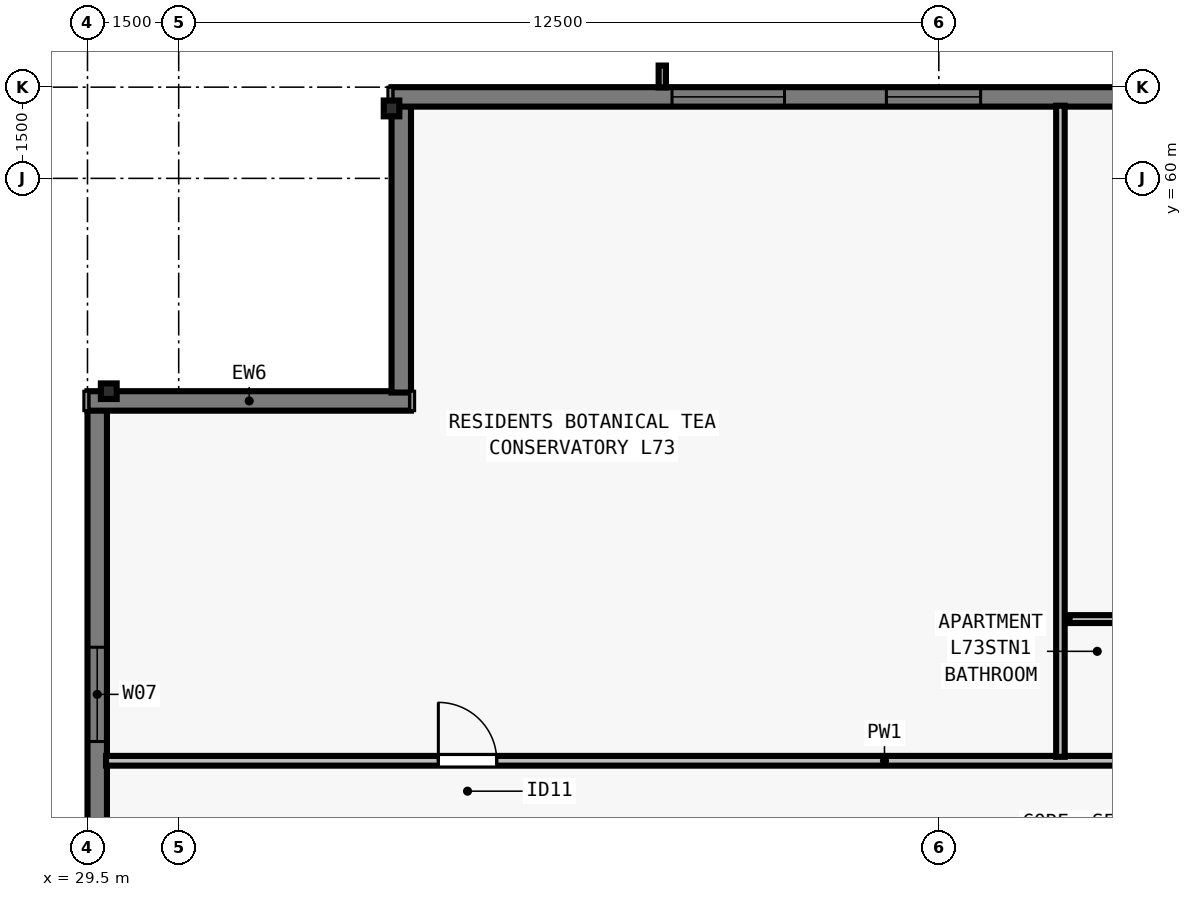
"""IFC4 building model, lengths in metres.
Left out: names, types, materials, properties, quantities, classifications, styles, units other than length and angle.
Written with IfcOpenShell. Run it as: python <this file> out.ifc"""

import sys

from ifc_helpers import new_model, si_unit, direction, frame, frame_2d, origin, origin_2d, place, context, subcontext, project, spatial, rectangle, i_section, extrude, element, fill, save


model = new_model("IFC4")
c1 = context("Model", 3, precision=1e-05, world=origin(), true_north=direction((0.0, 1.0)))
c2 = subcontext(c1, "Body", "Model", "MODEL_VIEW")
j1 = project(units=[si_unit("LENGTHUNIT", "METRE"), si_unit("PLANEANGLEUNIT", "RADIAN")], contexts=[c1])
p1 = place(None, origin())
s1 = spatial("IfcSite", under=j1, at=p1, CompositionType="ELEMENT")
p2 = place(p1, origin())
s2 = spatial("IfcBuilding", under=s1, at=p2, CompositionType="ELEMENT")
p3 = place(p2, frame((0.0, 0.0, 265.5)))
s3 = spatial("IfcBuildingStorey", under=s2, at=p3, CompositionType="ELEMENT", Elevation=265.5)
for number, where, z_axis, x_axis in (
    (1, (34.5, 61.15, 0.0), (0.0, 0.0, 1.0), (1.0, 0.0, 0.0)),
    (2, (29.85, 56.5, 0.0), (0.0, 0.0, 1.0), (0.0, 1.0, 0.0)),
):
    element("IfcColumn", number, at=place(p3, frame(where, z_axis=z_axis, x_axis=x_axis)), inside=s3, PredefinedType="COLUMN", context=c2, shape_type="SweptSolid", body=[
        extrude(i_section(OverallWidth=0.256, OverallDepth=0.26, WebThickness=0.01, FlangeThickness=0.017, FilletRadius=0.013, at=origin_2d()), origin(), (0.0, 0.0, 1.0), 3.5),
    ])
p4 = place(p3, frame((29.66, 21.5, 0.0), z_axis=(0.0, 0.0, 1.0), x_axis=(0.0, 1.0, 0.0)))
e3 = element("IfcWall", 3, at=p4, inside=s3, PredefinedType="SOLIDWALL", context=c2, shape_type="SweptSolid", body=[
    extrude(rectangle(XDim=34.702, YDim=0.32, at=frame_2d((17.351, 0.0))), origin(), (0.0, 0.0, 1.0), 3.29),
])
p5 = place(p4, frame((6.888, 0.0, 0.8)))
e4 = element("IfcOpeningElement", 4, at=p5, cuts=e3, PredefinedType="OPENING", context=c2, shape_type="SweptSolid", body=[
    extrude(rectangle(XDim=1.55, YDim=1.678, at=frame_2d((0.775, 0.839))), frame((0.0, 0.17, 0.0), z_axis=(0.0, -1.0, 0.0), x_axis=(1.0, 0.0, 0.0)), (0.0, 0.0, 1.0), 0.34),
])
p6 = place(p4, frame((10.113, 0.0, 0.8)))
e5 = element("IfcOpeningElement", 5, at=p6, cuts=e3, PredefinedType="OPENING", context=c2, shape_type="SweptSolid", body=[
    extrude(rectangle(XDim=1.85, YDim=1.678, at=frame_2d((0.925, 0.839))), frame((0.0, 0.17, 0.0), z_axis=(0.0, -1.0, 0.0), x_axis=(1.0, 0.0, 0.0)), (0.0, 0.0, 1.0), 0.34),
])
p7 = place(p4, frame((14.888, 0.0, 0.8)))
e6 = element("IfcOpeningElement", 6, at=p7, cuts=e3, PredefinedType="OPENING", context=c2, shape_type="SweptSolid", body=[
    extrude(rectangle(XDim=1.55, YDim=1.678, at=frame_2d((0.775, 0.839))), frame((0.0, 0.17, 0.0), z_axis=(0.0, -1.0, 0.0), x_axis=(1.0, 0.0, 0.0)), (0.0, 0.0, 1.0), 0.34),
])
p8 = place(p4, frame((18.114, 0.0, 0.8)))
e7 = element("IfcOpeningElement", 7, at=p8, cuts=e3, PredefinedType="OPENING", context=c2, shape_type="SweptSolid", body=[
    extrude(rectangle(XDim=1.85, YDim=1.678, at=frame_2d((0.925, 0.839))), frame((0.0, 0.17, 0.0), z_axis=(0.0, -1.0, 0.0), x_axis=(1.0, 0.0, 0.0)), (0.0, 0.0, 1.0), 0.34),
])
p9 = place(p4, frame((23.614, 0.0, 0.8)))
e8 = element("IfcOpeningElement", 8, at=p9, cuts=e3, PredefinedType="OPENING", context=c2, shape_type="SweptSolid", body=[
    extrude(rectangle(XDim=1.85, YDim=1.678, at=frame_2d((0.925, 0.839))), frame((0.0, 0.17, 0.0), z_axis=(0.0, -1.0, 0.0), x_axis=(1.0, 0.0, 0.0)), (0.0, 0.0, 1.0), 0.34),
])
p10 = place(p4, frame((29.24, 0.0, 0.8)))
e9 = element("IfcOpeningElement", 9, at=p10, cuts=e3, PredefinedType="OPENING", context=c2, shape_type="SweptSolid", body=[
    extrude(rectangle(XDim=1.55, YDim=1.678, at=frame_2d((0.775, 0.839))), frame((0.0, 0.17, 0.0), z_axis=(0.0, -1.0, 0.0), x_axis=(1.0, 0.0, 0.0)), (0.0, 0.0, 1.0), 0.34),
])
p11 = place(p3, frame((29.5, 56.34, 0.0), z_axis=(0.0, 0.0, 1.0), x_axis=(1.0, 0.0, 0.0)))
e10 = element("IfcWall", 10, at=p11, inside=s3, PredefinedType="SOLIDWALL", context=c2, shape_type="SweptSolid", body=[
    extrude(rectangle(XDim=5.32, YDim=0.32, at=frame_2d((2.66, 0.0))), origin(), (0.0, 0.0, 1.0), 3.29),
])
p12 = place(p3, frame((34.66, 56.478, 0.0), z_axis=(0.0, 0.0, 1.0), x_axis=(0.0, 1.0, 0.0)))
e11 = element("IfcWall", 11, at=p12, inside=s3, PredefinedType="SOLIDWALL", context=c2, shape_type="SweptSolid", body=[
    extrude(rectangle(XDim=4.724, YDim=0.32, at=frame_2d((2.362, 0.0))), origin(), (0.0, 0.0, 1.0), 3.29),
])
p13 = place(p3, frame((34.5, 61.34, 0.0), z_axis=(0.0, 0.0, 1.0), x_axis=(1.0, 0.0, 0.0)))
e12 = element("IfcWall", 12, at=p13, inside=s3, PredefinedType="SOLIDWALL", context=c2, shape_type="SweptSolid", body=[
    extrude(rectangle(XDim=34.702, YDim=0.32, at=frame_2d((17.351, 0.0))), origin(), (0.0, 0.0, 1.0), 3.29),
])
p14 = place(p13, frame((4.613, 0.0, 0.8)))
e13 = element("IfcOpeningElement", 13, at=p14, cuts=e12, PredefinedType="OPENING", context=c2, shape_type="SweptSolid", body=[
    extrude(rectangle(XDim=1.85, YDim=1.678, at=frame_2d((0.925, 0.839))), frame((0.0, 0.17, 0.0), z_axis=(0.0, -1.0, 0.0), x_axis=(1.0, 0.0, 0.0)), (0.0, 0.0, 1.0), 0.34),
])
p15 = place(p13, frame((8.138, 0.0, 0.8)))
e14 = element("IfcOpeningElement", 14, at=p15, cuts=e12, PredefinedType="OPENING", context=c2, shape_type="SweptSolid", body=[
    extrude(rectangle(XDim=1.55, YDim=1.678, at=frame_2d((0.775, 0.839))), frame((0.0, 0.17, 0.0), z_axis=(0.0, -1.0, 0.0), x_axis=(1.0, 0.0, 0.0)), (0.0, 0.0, 1.0), 0.34),
])
p16 = place(p13, frame((14.888, 0.0, 0.8)))
e15 = element("IfcOpeningElement", 15, at=p16, cuts=e12, PredefinedType="OPENING", context=c2, shape_type="SweptSolid", body=[
    extrude(rectangle(XDim=1.55, YDim=1.678, at=frame_2d((0.775, 0.839))), frame((0.0, 0.17, 0.0), z_axis=(0.0, -1.0, 0.0), x_axis=(1.0, 0.0, 0.0)), (0.0, 0.0, 1.0), 0.34),
])
p17 = place(p13, frame((19.364, 0.0, 0.8)))
e16 = element("IfcOpeningElement", 16, at=p17, cuts=e12, PredefinedType="OPENING", context=c2, shape_type="SweptSolid", body=[
    extrude(rectangle(XDim=1.85, YDim=1.678, at=frame_2d((0.925, 0.839))), frame((0.0, 0.17, 0.0), z_axis=(0.0, -1.0, 0.0), x_axis=(1.0, 0.0, 0.0)), (0.0, 0.0, 1.0), 0.34),
])
p18 = place(p13, frame((25.314, 0.0, 0.8)))
e17 = element("IfcOpeningElement", 17, at=p18, cuts=e12, PredefinedType="OPENING", context=c2, shape_type="SweptSolid", body=[
    extrude(rectangle(XDim=1.85, YDim=1.678, at=frame_2d((0.925, 0.839))), frame((0.0, 0.17, 0.0), z_axis=(0.0, -1.0, 0.0), x_axis=(1.0, 0.0, 0.0)), (0.0, 0.0, 1.0), 0.34),
])
p19 = place(p13, frame((28.389, 0.0, 0.8)))
e18 = element("IfcOpeningElement", 18, at=p19, cuts=e12, PredefinedType="OPENING", context=c2, shape_type="SweptSolid", body=[
    extrude(rectangle(XDim=1.55, YDim=1.678, at=frame_2d((0.775, 0.839))), frame((0.0, 0.17, 0.0), z_axis=(0.0, -1.0, 0.0), x_axis=(1.0, 0.0, 0.0)), (0.0, 0.0, 1.0), 0.34),
])
p20 = place(p3, frame((29.805, 50.423, 0.0), z_axis=(0.0, 0.0, 1.0), x_axis=(1.0, 0.0, 0.0)))
e19 = element("IfcWall", 19, at=p20, inside=s3, PredefinedType="PARTITIONING", context=c2, shape_type="SweptSolid", body=[
    extrude(rectangle(XDim=44.39, YDim=0.16, at=frame_2d((22.195, 0.0))), origin(), (0.0, 0.0, 1.0), 2.958),
])
p21 = place(p20, frame((5.465, 0.0, 0.0)))
e20 = element("IfcOpeningElement", 20, at=p21, cuts=e19, PredefinedType="OPENING", context=c2, shape_type="SweptSolid", body=[
    extrude(rectangle(XDim=0.96, YDim=2.12, at=frame_2d((0.48, 1.06))), frame((0.0, 0.09, 0.0), z_axis=(0.0, -1.0, 0.0), x_axis=(1.0, 0.0, 0.0)), (0.0, 0.0, 1.0), 0.18),
])
p22 = place(p20, frame((19.179, 0.0, 0.0)))
e21 = element("IfcOpeningElement", 21, at=p22, cuts=e19, PredefinedType="OPENING", context=c2, shape_type="SweptSolid", body=[
    extrude(rectangle(XDim=0.96, YDim=2.18, at=frame_2d((0.48, 1.09))), frame((0.0, 0.09, 0.0), z_axis=(0.0, -1.0, 0.0), x_axis=(1.0, 0.0, 0.0)), (0.0, 0.0, 1.0), 0.18),
])
p23 = place(p20, frame((26.106, 0.0, 0.0)))
e22 = element("IfcOpeningElement", 22, at=p23, cuts=e19, PredefinedType="OPENING", context=c2, shape_type="SweptSolid", body=[
    extrude(rectangle(XDim=0.96, YDim=2.18, at=frame_2d((0.48, 1.09))), frame((0.0, 0.09, 0.0), z_axis=(0.0, -1.0, 0.0), x_axis=(1.0, 0.0, 0.0)), (0.0, 0.0, 1.0), 0.18),
])
p24 = place(p20, frame((33.214, 0.0, 0.0)))
e23 = element("IfcOpeningElement", 23, at=p24, cuts=e19, PredefinedType="OPENING", context=c2, shape_type="SweptSolid", body=[
    extrude(rectangle(XDim=0.96, YDim=2.18, at=frame_2d((0.48, 1.09))), frame((0.0, 0.09, 0.0), z_axis=(0.0, -1.0, 0.0), x_axis=(1.0, 0.0, 0.0)), (0.0, 0.0, 1.0), 0.18),
])
p25 = place(p20, frame((40.501, 0.0, 0.0)))
e24 = element("IfcOpeningElement", 24, at=p25, cuts=e19, PredefinedType="OPENING", context=c2, shape_type="SweptSolid", body=[
    extrude(rectangle(XDim=0.96, YDim=2.18, at=frame_2d((0.48, 1.09))), frame((0.0, 0.09, 0.0), z_axis=(0.0, -1.0, 0.0), x_axis=(1.0, 0.0, 0.0)), (0.0, 0.0, 1.0), 0.18),
])
p26 = place(p3, frame((45.5, 50.488, 0.0), z_axis=(0.0, 0.0, 1.0), x_axis=(0.0, 1.0, 0.0)))
e25 = element("IfcWall", 25, at=p26, inside=s3, PredefinedType="PARTITIONING", context=c2, shape_type="SweptSolid", body=[
    extrude(rectangle(XDim=10.708, YDim=0.14, at=frame_2d((5.354, 0.0))), origin(), (0.0, 0.0, 1.0), 3.29),
])
p27 = place(p3, frame((45.65, 52.752, 0.0), z_axis=(0.0, 0.0, 1.0), x_axis=(1.0, 0.0, 0.0)))
e26 = element("IfcWall", 26, at=p27, inside=s3, PredefinedType="PLUMBINGWALL", context=c2, shape_type="SweptSolid", body=[
    extrude(rectangle(XDim=1.6, YDim=0.13, at=frame_2d((0.8, 0.0))), origin(), (0.0, 0.0, 1.0), 3.29),
])
p28 = place(p10, origin())
e27 = element("IfcWindow", 27, at=p28, inside=s3, PartitioningType="SINGLE_PANEL", PredefinedType="WINDOW", context=c2, shape_type="SweptSolid", body=[
    extrude(rectangle(XDim=1.55, YDim=1.678, at=frame_2d((0.775, 0.839))), frame((0.0, -0.05, 0.0), z_axis=(0.0, -1.0, 0.0), x_axis=(1.0, 0.0, 0.0)), (0.0, 0.0, 1.0), 0.06),
])
fill(e9, e27)
p29 = place(p14, origin())
e28 = element("IfcWindow", 28, at=p29, inside=s3, PartitioningType="SINGLE_PANEL", PredefinedType="WINDOW", context=c2, shape_type="SweptSolid", body=[
    extrude(rectangle(XDim=1.85, YDim=1.678, at=frame_2d((0.925, 0.839))), frame((0.0, -0.05, 0.0), z_axis=(0.0, -1.0, 0.0), x_axis=(1.0, 0.0, 0.0)), (0.0, 0.0, 1.0), 0.06),
])
fill(e13, e28)
p30 = place(p15, origin())
e29 = element("IfcWindow", 29, at=p30, inside=s3, PartitioningType="SINGLE_PANEL", PredefinedType="WINDOW", context=c2, shape_type="SweptSolid", body=[
    extrude(rectangle(XDim=1.55, YDim=1.678, at=frame_2d((0.775, 0.839))), frame((0.0, -0.05, 0.0), z_axis=(0.0, -1.0, 0.0), x_axis=(1.0, 0.0, 0.0)), (0.0, 0.0, 1.0), 0.06),
])
fill(e14, e29)
p31 = place(p21, origin())
e30 = element("IfcDoor", 30, at=p31, inside=s3, OperationType="SINGLE_SWING_LEFT", PredefinedType="DOOR", context=c2, shape_type="SweptSolid", body=[
    extrude(rectangle(XDim=0.96, YDim=2.12, at=frame_2d((0.48, 1.06))), frame((0.0, 0.025, 0.0), z_axis=(0.0, -1.0, 0.0), x_axis=(1.0, 0.0, 0.0)), (0.0, 0.0, 1.0), 0.05),
])
fill(e20, e30)
save(model, sys.argv[1])
